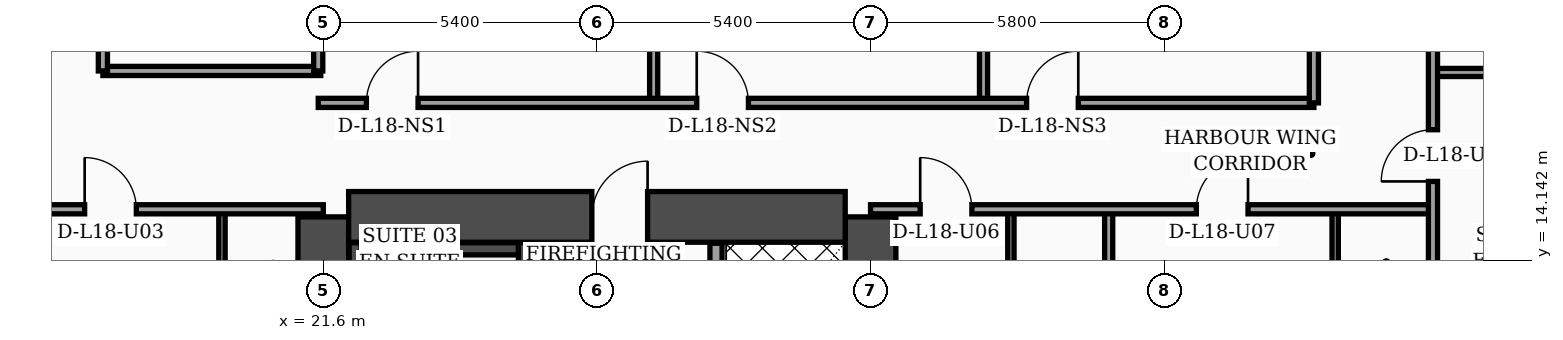
"""IFC4 building model, lengths in metres.
Left out: names, types, materials, properties, quantities, classifications, styles, units other than length and angle.
Written with IfcOpenShell. Run it as: python <this file> out.ifc"""

import sys

from ifc_helpers import new_model, si_unit, direction, frame, frame_2d, origin, place, context, subcontext, project, spatial, rectangle, extrude, element, fill, save


model = new_model("IFC4")
c1 = context("Model", 3, precision=1e-05, world=origin(), true_north=direction((0.0, 1.0)))
c2 = subcontext(c1, "Body", "Model", "MODEL_VIEW")
j1 = project(units=[si_unit("LENGTHUNIT", "METRE"), si_unit("PLANEANGLEUNIT", "RADIAN")], contexts=[c1])
p1 = place(None, origin())
s1 = spatial("IfcSite", under=j1, at=p1, CompositionType="ELEMENT")
p2 = place(p1, origin())
s2 = spatial("IfcBuilding", under=s1, at=p2, CompositionType="ELEMENT")
p3 = place(p2, frame((0.0, 0.0, 77.4)))
s3 = spatial("IfcBuildingStorey", under=s2, at=p3, CompositionType="ELEMENT", Elevation=77.4)
for number, where, z_axis, x_axis in (
    (1, (21.6, 4.6, 0.0), (0.0, 0.0, 1.0), (0.0, 1.0, 0.0)),
    (2, (32.4, 4.6, 0.0), (0.0, 0.0, 1.0), (0.0, 1.0, 0.0)),
):
    element("IfcWall", number, at=place(p3, frame(where, z_axis=z_axis, x_axis=x_axis)), inside=s3, PredefinedType="SHEAR", context=c2, shape_type="SweptSolid", body=[
        extrude(rectangle(XDim=10.4, YDim=1.0, at=frame_2d((5.2, 0.0))), origin(), (0.0, 0.0, 1.0), 3.56),
    ])
p4 = place(p3, frame((22.1, 15.0, 0.0), z_axis=(0.0, 0.0, 1.0), x_axis=(1.0, 0.0, 0.0)))
e3 = element("IfcWall", 3, at=p4, inside=s3, PredefinedType="SHEAR", context=c2, shape_type="SweptSolid", body=[
    extrude(rectangle(XDim=9.8, YDim=1.0, at=frame_2d((4.9, 0.0))), origin(), (0.0, 0.0, 1.0), 3.56),
])
p5 = place(p4, frame((4.8, 0.0, 0.0)))
e4 = element("IfcOpeningElement", 4, at=p5, cuts=e3, PredefinedType="OPENING", context=c2, shape_type="SweptSolid", body=[
    extrude(rectangle(XDim=1.1, YDim=2.2, at=frame_2d((0.55, 1.1))), frame((0.0, 0.51, 0.0), z_axis=(0.0, -1.0, 0.0), x_axis=(1.0, 0.0, 0.0)), (0.0, 0.0, 1.0), 1.02),
])
p6 = place(p3, frame((22.23, 5.1, 0.0), z_axis=(0.0, 0.0, 1.0), x_axis=(0.0, 1.0, 0.0)))
e5 = element("IfcWall", 5, at=p6, inside=s3, PredefinedType="SOLIDWALL", context=c2, shape_type="SweptSolid", body=[
    extrude(rectangle(XDim=9.39, YDim=0.24, at=frame_2d((4.695, 0.0))), origin(), (0.0, 0.0, 1.0), 3.56),
])
p7 = place(p3, frame((25.57, 5.1, 0.0), z_axis=(0.0, 0.0, 1.0), x_axis=(0.0, 1.0, 0.0)))
e6 = element("IfcWall", 6, at=p7, inside=s3, PredefinedType="SOLIDWALL", context=c2, shape_type="SweptSolid", body=[
    extrude(rectangle(XDim=9.39, YDim=0.24, at=frame_2d((4.695, 0.0))), origin(), (0.0, 0.0, 1.0), 3.56),
])
p8 = place(p7, frame((0.35, 0.0, 0.0)))
e7 = element("IfcOpeningElement", 7, at=p8, cuts=e6, PredefinedType="OPENING", context=c2, shape_type="SweptSolid", body=[
    extrude(rectangle(XDim=1.15, YDim=2.2, at=frame_2d((0.575, 1.1))), frame((0.0, 0.13, 0.0), z_axis=(0.0, -1.0, 0.0), x_axis=(1.0, 0.0, 0.0)), (0.0, 0.0, 1.0), 0.26),
])
p9 = place(p3, frame((22.35, 14.37, 0.0), z_axis=(0.0, 0.0, 1.0), x_axis=(1.0, 0.0, 0.0)))
e8 = element("IfcWall", 8, at=p9, inside=s3, PredefinedType="SOLIDWALL", context=c2, shape_type="SweptSolid", body=[
    extrude(rectangle(XDim=3.1, YDim=0.24, at=frame_2d((1.55, 0.0))), origin(), (0.0, 0.0, 1.0), 3.56),
])
p10 = place(p3, frame((29.35, 5.12, 0.0), z_axis=(0.0, 0.0, 1.0), x_axis=(0.0, 1.0, 0.0)))
e9 = element("IfcWall", 9, at=p10, inside=s3, PredefinedType="SOLIDWALL", context=c2, shape_type="SweptSolid", body=[
    extrude(rectangle(XDim=9.36, YDim=0.24, at=frame_2d((4.68, 0.0))), origin(), (0.0, 0.0, 1.0), 3.56),
])
p11 = place(p10, frame((0.55, 0.0, 0.0)))
e10 = element("IfcOpeningElement", 10, at=p11, cuts=e9, PredefinedType="OPENING", context=c2, shape_type="SweptSolid", body=[
    extrude(rectangle(XDim=1.3, YDim=2.35, at=frame_2d((0.65, 1.175))), frame((0.0, 0.13, 0.0), z_axis=(0.0, -1.0, 0.0), x_axis=(1.0, 0.0, 0.0)), (0.0, 0.0, 1.0), 0.26),
])
p12 = place(p3, frame((19.6, 2.44, 0.0), z_axis=(0.0, 0.0, 1.0), x_axis=(0.0, 1.0, 0.0)))
e11 = element("IfcWall", 11, at=p12, inside=s3, PredefinedType="PARTITIONING", context=c2, shape_type="SweptSolid", body=[
    extrude(rectangle(XDim=12.71, YDim=0.125, at=frame_2d((6.355, 0.0))), origin(), (0.0, 0.0, 1.0), 2.34),
])
p13 = place(p12, frame((4.34, 0.0, 0.0)))
e12 = element("IfcOpeningElement", 12, at=p13, cuts=e11, PredefinedType="OPENING", context=c2, shape_type="SweptSolid", body=[
    extrude(rectangle(XDim=0.96, YDim=2.2, at=frame_2d((0.48, 1.1))), frame((0.0, 0.073, 0.0), z_axis=(0.0, -1.0, 0.0), x_axis=(1.0, 0.0, 0.0)), (0.0, 0.0, 1.0), 0.145),
])
p14 = place(p12, frame((10.18, 0.0, 0.0)))
e13 = element("IfcOpeningElement", 13, at=p14, cuts=e11, PredefinedType="OPENING", context=c2, shape_type="SweptSolid", body=[
    extrude(rectangle(XDim=0.9, YDim=2.15, at=frame_2d((0.45, 1.075))), frame((0.0, 0.073, 0.0), z_axis=(0.0, -1.0, 0.0), x_axis=(1.0, 0.0, 0.0)), (0.0, 0.0, 1.0), 0.145),
])
p15 = place(p3, frame((15.15, 15.15, 0.0), z_axis=(0.0, 0.0, 1.0), x_axis=(1.0, 0.0, 0.0)))
e14 = element("IfcWall", 14, at=p15, inside=s3, PredefinedType="PARTITIONING", context=c2, shape_type="SweptSolid", body=[
    extrude(rectangle(XDim=6.45, YDim=0.18, at=frame_2d((3.225, 0.0))), origin(), (0.0, 0.0, 1.0), 2.34),
])
p16 = place(p15, frame((1.74, 0.0, 0.0)))
e15 = element("IfcOpeningElement", 15, at=p16, cuts=e14, PredefinedType="OPENING", context=c2, shape_type="SweptSolid", body=[
    extrude(rectangle(XDim=1.02, YDim=2.2, at=frame_2d((0.51, 1.1))), frame((0.0, 0.1, 0.0), z_axis=(0.0, -1.0, 0.0), x_axis=(1.0, 0.0, 0.0)), (0.0, 0.0, 1.0), 0.2),
])
p17 = place(p3, frame((17.25, 17.88, 0.0), z_axis=(0.0, 0.0, 1.0), x_axis=(1.0, 0.0, 0.0)))
e16 = element("IfcWall", 16, at=p17, inside=s3, PredefinedType="PARTITIONING", context=c2, shape_type="SweptSolid", body=[
    extrude(rectangle(XDim=4.3, YDim=0.18, at=frame_2d((2.15, 0.0))), origin(), (0.0, 0.0, 1.0), 3.09),
])
p18 = place(p3, frame((21.5, 17.88, 0.0), z_axis=(0.0, 0.0, 1.0), x_axis=(0.0, 1.0, 0.0)))
e17 = element("IfcWall", 17, at=p18, inside=s3, PredefinedType="PARTITIONING", context=c2, shape_type="SweptSolid", body=[
    extrude(rectangle(XDim=6.44, YDim=0.18, at=frame_2d((3.22, 0.0))), origin(), (0.0, 0.0, 1.0), 3.09),
])
p19 = place(p3, frame((17.25, 17.88, 0.0), z_axis=(0.0, 0.0, 1.0), x_axis=(0.0, 1.0, 0.0)))
e18 = element("IfcWall", 18, at=p19, inside=s3, PredefinedType="PARTITIONING", context=c2, shape_type="SweptSolid", body=[
    extrude(rectangle(XDim=6.44, YDim=0.18, at=frame_2d((3.22, 0.0))), origin(), (0.0, 0.0, 1.0), 3.09),
])
p20 = place(p19, frame((0.65, 0.0, 0.0)))
e19 = element("IfcOpeningElement", 19, at=p20, cuts=e18, PredefinedType="OPENING", context=c2, shape_type="SweptSolid", body=[
    extrude(rectangle(XDim=0.98, YDim=2.15, at=frame_2d((0.49, 1.075))), frame((0.0, 0.1, 0.0), z_axis=(0.0, -1.0, 0.0), x_axis=(1.0, 0.0, 0.0)), (0.0, 0.0, 1.0), 0.2),
])
p21 = place(p19, frame((3.27, 0.0, 0.0)))
e20 = element("IfcOpeningElement", 20, at=p21, cuts=e18, PredefinedType="OPENING", context=c2, shape_type="SweptSolid", body=[
    extrude(rectangle(XDim=0.96, YDim=2.2, at=frame_2d((0.48, 1.1))), frame((0.0, 0.1, 0.0), z_axis=(0.0, -1.0, 0.0), x_axis=(1.0, 0.0, 0.0)), (0.0, 0.0, 1.0), 0.2),
])
p22 = place(p3, frame((35.17, 2.44, 0.0), z_axis=(0.0, 0.0, 1.0), x_axis=(0.0, 1.0, 0.0)))
e21 = element("IfcWall", 21, at=p22, inside=s3, PredefinedType="PARTITIONING", context=c2, shape_type="SweptSolid", body=[
    extrude(rectangle(XDim=12.71, YDim=0.125, at=frame_2d((6.355, 0.0))), origin(), (0.0, 0.0, 1.0), 2.84),
])
p23 = place(p22, frame((4.35, 0.0, 0.0)))
e22 = element("IfcOpeningElement", 22, at=p23, cuts=e21, PredefinedType="OPENING", context=c2, shape_type="SweptSolid", body=[
    extrude(rectangle(XDim=0.96, YDim=2.2, at=frame_2d((0.48, 1.1))), frame((0.0, 0.073, 0.0), z_axis=(0.0, -1.0, 0.0), x_axis=(1.0, 0.0, 0.0)), (0.0, 0.0, 1.0), 0.145),
])
p24 = place(p22, frame((10.21, 0.0, 0.0)))
e23 = element("IfcOpeningElement", 23, at=p24, cuts=e21, PredefinedType="OPENING", context=c2, shape_type="SweptSolid", body=[
    extrude(rectangle(XDim=0.9, YDim=2.15, at=frame_2d((0.45, 1.075))), frame((0.0, 0.073, 0.0), z_axis=(0.0, -1.0, 0.0), x_axis=(1.0, 0.0, 0.0)), (0.0, 0.0, 1.0), 0.145),
])
p25 = place(p3, frame((41.57, 2.44, 0.0), z_axis=(0.0, 0.0, 1.0), x_axis=(0.0, 1.0, 0.0)))
e24 = element("IfcWall", 24, at=p25, inside=s3, PredefinedType="PARTITIONING", context=c2, shape_type="SweptSolid", body=[
    extrude(rectangle(XDim=12.71, YDim=0.125, at=frame_2d((6.355, 0.0))), origin(), (0.0, 0.0, 1.0), 3.04),
])
p26 = place(p25, frame((4.35, 0.0, 0.0)))
e25 = element("IfcOpeningElement", 25, at=p26, cuts=e24, PredefinedType="OPENING", context=c2, shape_type="SweptSolid", body=[
    extrude(rectangle(XDim=0.96, YDim=2.2, at=frame_2d((0.48, 1.1))), frame((0.0, 0.073, 0.0), z_axis=(0.0, -1.0, 0.0), x_axis=(1.0, 0.0, 0.0)), (0.0, 0.0, 1.0), 0.145),
])
p27 = place(p25, frame((10.21, 0.0, 0.0)))
e26 = element("IfcOpeningElement", 26, at=p27, cuts=e24, PredefinedType="OPENING", context=c2, shape_type="SweptSolid", body=[
    extrude(rectangle(XDim=0.9, YDim=2.15, at=frame_2d((0.45, 1.075))), frame((0.0, 0.073, 0.0), z_axis=(0.0, -1.0, 0.0), x_axis=(1.0, 0.0, 0.0)), (0.0, 0.0, 1.0), 0.145),
])
p28 = place(p3, frame((37.1, 2.44, 0.0), z_axis=(0.0, 0.0, 1.0), x_axis=(0.0, 1.0, 0.0)))
e27 = element("IfcWall", 27, at=p28, inside=s3, PredefinedType="PARTITIONING", context=c2, shape_type="SweptSolid", body=[
    extrude(rectangle(XDim=12.71, YDim=0.16, at=frame_2d((6.355, 0.0))), origin(), (0.0, 0.0, 1.0), 2.84),
])
p29 = place(p3, frame((32.4, 15.15, 0.0), z_axis=(0.0, 0.0, 1.0), x_axis=(1.0, 0.0, 0.0)))
e28 = element("IfcWall", 28, at=p29, inside=s3, PredefinedType="PARTITIONING", context=c2, shape_type="SweptSolid", body=[
    extrude(rectangle(XDim=11.1, YDim=0.18, at=frame_2d((5.55, 0.0))), origin(), (0.0, 0.0, 1.0), 2.84),
])
p30 = place(p29, frame((0.98, 0.0, 0.0)))
e29 = element("IfcOpeningElement", 29, at=p30, cuts=e28, PredefinedType="OPENING", context=c2, shape_type="SweptSolid", body=[
    extrude(rectangle(XDim=1.02, YDim=2.2, at=frame_2d((0.51, 1.1))), frame((0.0, 0.1, 0.0), z_axis=(0.0, -1.0, 0.0), x_axis=(1.0, 0.0, 0.0)), (0.0, 0.0, 1.0), 0.2),
])
p31 = place(p29, frame((6.43, 0.0, 0.0)))
e30 = element("IfcOpeningElement", 30, at=p31, cuts=e28, PredefinedType="OPENING", context=c2, shape_type="SweptSolid", body=[
    extrude(rectangle(XDim=1.02, YDim=2.2, at=frame_2d((0.51, 1.1))), frame((0.0, 0.1, 0.0), z_axis=(0.0, -1.0, 0.0), x_axis=(1.0, 0.0, 0.0)), (0.0, 0.0, 1.0), 0.2),
])
p32 = place(p3, frame((28.12, 17.25, 0.0), z_axis=(0.0, 0.0, 1.0), x_axis=(0.0, 1.0, 0.0)))
e31 = element("IfcWall", 31, at=p32, inside=s3, PredefinedType="PARTITIONING", context=c2, shape_type="SweptSolid", body=[
    extrude(rectangle(XDim=10.31, YDim=0.16, at=frame_2d((5.155, 0.0))), origin(), (0.0, 0.0, 1.0), 2.84),
])
p33 = place(p3, frame((34.63, 17.25, 0.0), z_axis=(0.0, 0.0, 1.0), x_axis=(0.0, 1.0, 0.0)))
e32 = element("IfcWall", 32, at=p33, inside=s3, PredefinedType="PARTITIONING", context=c2, shape_type="SweptSolid", body=[
    extrude(rectangle(XDim=13.38, YDim=0.16, at=frame_2d((6.69, 0.0))), origin(), (0.0, 0.0, 1.0), 2.84),
])
p34 = place(p3, frame((21.5, 17.25, 0.0), z_axis=(0.0, 0.0, 1.0), x_axis=(1.0, 0.0, 0.0)))
e33 = element("IfcWall", 33, at=p34, inside=s3, PredefinedType="PARTITIONING", context=c2, shape_type="SweptSolid", body=[
    extrude(rectangle(XDim=19.65, YDim=0.18, at=frame_2d((9.825, 0.0))), origin(), (0.0, 0.0, 1.0), 2.84),
])
p35 = place(p34, frame((0.95, 0.0, 0.0)))
e34 = element("IfcOpeningElement", 34, at=p35, cuts=e33, PredefinedType="OPENING", context=c2, shape_type="SweptSolid", body=[
    extrude(rectangle(XDim=1.02, YDim=2.2, at=frame_2d((0.51, 1.1))), frame((0.0, 0.1, 0.0), z_axis=(0.0, -1.0, 0.0), x_axis=(1.0, 0.0, 0.0)), (0.0, 0.0, 1.0), 0.2),
])
p36 = place(p34, frame((7.47, 0.0, 0.0)))
e35 = element("IfcOpeningElement", 35, at=p36, cuts=e33, PredefinedType="OPENING", context=c2, shape_type="SweptSolid", body=[
    extrude(rectangle(XDim=1.02, YDim=2.2, at=frame_2d((0.51, 1.1))), frame((0.0, 0.1, 0.0), z_axis=(0.0, -1.0, 0.0), x_axis=(1.0, 0.0, 0.0)), (0.0, 0.0, 1.0), 0.2),
])
p37 = place(p34, frame((13.98, 0.0, 0.0)))
e36 = element("IfcOpeningElement", 36, at=p37, cuts=e33, PredefinedType="OPENING", context=c2, shape_type="SweptSolid", body=[
    extrude(rectangle(XDim=1.02, YDim=2.2, at=frame_2d((0.51, 1.1))), frame((0.0, 0.1, 0.0), z_axis=(0.0, -1.0, 0.0), x_axis=(1.0, 0.0, 0.0)), (0.0, 0.0, 1.0), 0.2),
])
p38 = place(p3, frame((41.15, 17.25, 0.0), z_axis=(0.0, 0.0, 1.0), x_axis=(0.0, 1.0, 0.0)))
e37 = element("IfcWall", 37, at=p38, inside=s3, PredefinedType="PARTITIONING", context=c2, shape_type="SweptSolid", body=[
    extrude(rectangle(XDim=16.46, YDim=0.18, at=frame_2d((8.23, 0.0))), origin(), (0.0, 0.0, 1.0), 2.84),
])
p39 = place(p3, frame((43.5, 17.85, 0.0), z_axis=(0.0, 0.0, 1.0), x_axis=(1.0, 0.0, 0.0)))
e38 = element("IfcWall", 38, at=p39, inside=s3, PredefinedType="PARTITIONING", context=c2, shape_type="SweptSolid", body=[
    extrude(rectangle(XDim=16.18, YDim=0.16, at=frame_2d((8.09, 0.0))), origin(), (0.0, 0.0, 1.0), 2.84),
])
p40 = place(p3, frame((43.5, 2.44, 0.0), z_axis=(0.0, 0.0, 1.0), x_axis=(0.0, 1.0, 0.0)))
e39 = element("IfcWall", 39, at=p40, inside=s3, PredefinedType="PARTITIONING", context=c2, shape_type="SweptSolid", body=[
    extrude(rectangle(XDim=31.04, YDim=0.18, at=frame_2d((15.52, 0.0))), origin(), (0.0, 0.0, 1.0), 2.84),
])
p41 = place(p40, frame((13.26, 0.0, 0.0)))
e40 = element("IfcOpeningElement", 40, at=p41, cuts=e39, PredefinedType="OPENING", context=c2, shape_type="SweptSolid", body=[
    extrude(rectangle(XDim=1.02, YDim=2.2, at=frame_2d((0.51, 1.1))), frame((0.0, 0.1, 0.0), z_axis=(0.0, -1.0, 0.0), x_axis=(1.0, 0.0, 0.0)), (0.0, 0.0, 1.0), 0.2),
])
p42 = place(p40, frame((17.77, 0.0, 0.0)))
e41 = element("IfcOpeningElement", 41, at=p42, cuts=e39, PredefinedType="OPENING", context=c2, shape_type="SweptSolid", body=[
    extrude(rectangle(XDim=1.02, YDim=2.2, at=frame_2d((0.51, 1.1))), frame((0.0, 0.1, 0.0), z_axis=(0.0, -1.0, 0.0), x_axis=(1.0, 0.0, 0.0)), (0.0, 0.0, 1.0), 0.2),
])
p43 = place(p40, frame((25.58, 0.0, 0.0)))
e42 = element("IfcOpeningElement", 42, at=p43, cuts=e39, PredefinedType="OPENING", context=c2, shape_type="SweptSolid", body=[
    extrude(rectangle(XDim=1.02, YDim=2.2, at=frame_2d((0.51, 1.1))), frame((0.0, 0.1, 0.0), z_axis=(0.0, -1.0, 0.0), x_axis=(1.0, 0.0, 0.0)), (0.0, 0.0, 1.0), 0.2),
])
p44 = place(p16, origin())
e43 = element("IfcDoor", 43, at=p44, inside=s3, OperationType="SINGLE_SWING_LEFT", PredefinedType="DOOR", context=c2, shape_type="SweptSolid", body=[
    extrude(rectangle(XDim=1.02, YDim=2.2, at=frame_2d((0.51, 1.1))), frame((0.0, 0.025, 0.0), z_axis=(0.0, -1.0, 0.0), x_axis=(1.0, 0.0, 0.0)), (0.0, 0.0, 1.0), 0.05),
])
fill(e15, e43)
p45 = place(p30, origin())
e44 = element("IfcDoor", 44, at=p45, inside=s3, OperationType="SINGLE_SWING_LEFT", PredefinedType="DOOR", context=c2, shape_type="SweptSolid", body=[
    extrude(rectangle(XDim=1.02, YDim=2.2, at=frame_2d((0.51, 1.1))), frame((0.0, 0.025, 0.0), z_axis=(0.0, -1.0, 0.0), x_axis=(1.0, 0.0, 0.0)), (0.0, 0.0, 1.0), 0.05),
])
fill(e29, e44)
p46 = place(p31, origin())
e45 = element("IfcDoor", 45, at=p46, inside=s3, OperationType="SINGLE_SWING_RIGHT", PredefinedType="DOOR", context=c2, shape_type="SweptSolid", body=[
    extrude(rectangle(XDim=1.02, YDim=2.2, at=frame_2d((0.51, 1.1))), frame((0.0, 0.025, 0.0), z_axis=(0.0, -1.0, 0.0), x_axis=(1.0, 0.0, 0.0)), (0.0, 0.0, 1.0), 0.05),
])
fill(e30, e45)
p47 = place(p35, origin())
e46 = element("IfcDoor", 46, at=p47, inside=s3, OperationType="SINGLE_SWING_RIGHT", PredefinedType="DOOR", context=c2, shape_type="SweptSolid", body=[
    extrude(rectangle(XDim=1.02, YDim=2.2, at=frame_2d((0.51, 1.1))), frame((0.0, 0.025, 0.0), z_axis=(0.0, -1.0, 0.0), x_axis=(1.0, 0.0, 0.0)), (0.0, 0.0, 1.0), 0.05),
])
fill(e34, e46)
p48 = place(p36, origin())
e47 = element("IfcDoor", 47, at=p48, inside=s3, OperationType="SINGLE_SWING_LEFT", PredefinedType="DOOR", context=c2, shape_type="SweptSolid", body=[
    extrude(rectangle(XDim=1.02, YDim=2.2, at=frame_2d((0.51, 1.1))), frame((0.0, 0.025, 0.0), z_axis=(0.0, -1.0, 0.0), x_axis=(1.0, 0.0, 0.0)), (0.0, 0.0, 1.0), 0.05),
])
fill(e35, e47)
p49 = place(p37, origin())
e48 = element("IfcDoor", 48, at=p49, inside=s3, OperationType="SINGLE_SWING_RIGHT", PredefinedType="DOOR", context=c2, shape_type="SweptSolid", body=[
    extrude(rectangle(XDim=1.02, YDim=2.2, at=frame_2d((0.51, 1.1))), frame((0.0, 0.025, 0.0), z_axis=(0.0, -1.0, 0.0), x_axis=(1.0, 0.0, 0.0)), (0.0, 0.0, 1.0), 0.05),
])
fill(e36, e48)
p50 = place(p41, origin())
e49 = element("IfcDoor", 49, at=p50, inside=s3, OperationType="SINGLE_SWING_LEFT", PredefinedType="DOOR", context=c2, shape_type="SweptSolid", body=[
    extrude(rectangle(XDim=1.02, YDim=2.2, at=frame_2d((0.51, 1.1))), frame((0.0, 0.025, 0.0), z_axis=(0.0, -1.0, 0.0), x_axis=(1.0, 0.0, 0.0)), (0.0, 0.0, 1.0), 0.05),
])
fill(e40, e49)
p51 = place(p5, origin())
e50 = element("IfcDoor", 50, at=p51, inside=s3, OperationType="SINGLE_SWING_RIGHT", PredefinedType="DOOR", context=c2, shape_type="SweptSolid", body=[
    extrude(rectangle(XDim=1.1, YDim=2.2, at=frame_2d((0.55, 1.1))), frame((0.0, 0.025, 0.0), z_axis=(0.0, -1.0, 0.0), x_axis=(1.0, 0.0, 0.0)), (0.0, 0.0, 1.0), 0.05),
])
fill(e4, e50)
save(model, sys.argv[1])
